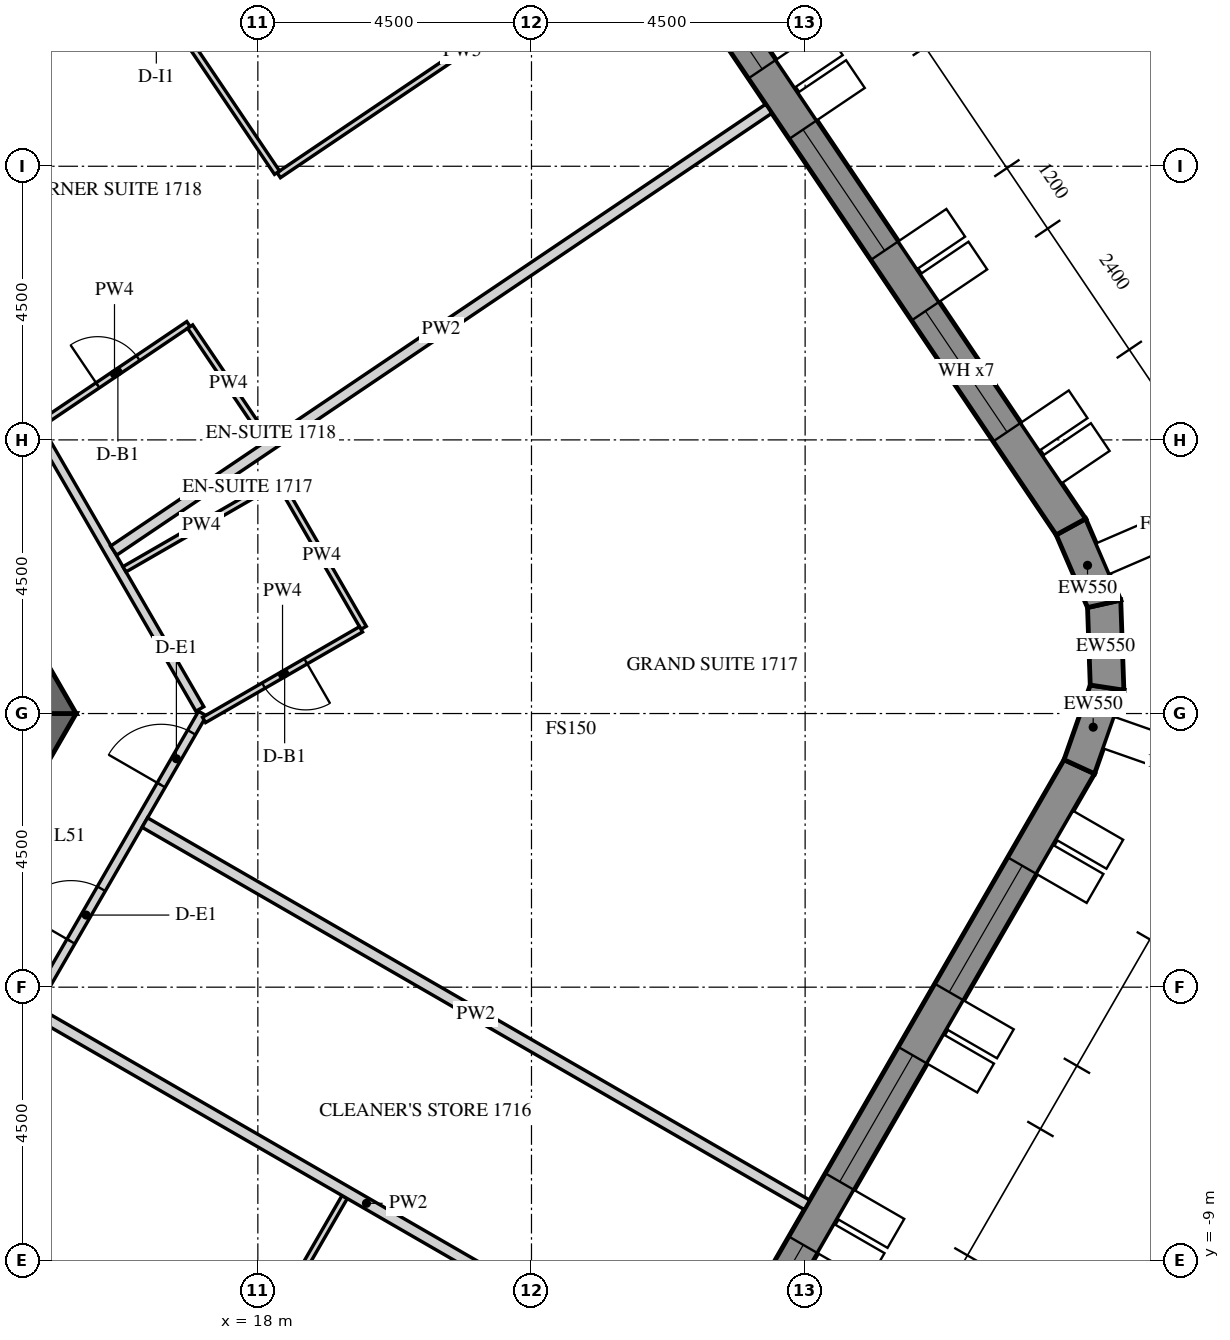
"""IFC4 building model, lengths in metres.
Left out: names, types, materials, properties, quantities, classifications, styles, units other than length and angle.
Written with IfcOpenShell. Run it as: python <this file> out.ifc"""

import sys

from ifc_helpers import new_model, si_unit, direction, frame, frame_2d, origin, place, context, subcontext, project, spatial, polyline, rectangle, outline, extrude, element, fill, save


model = new_model("IFC4")
c1 = context("Model", 3, precision=1e-05, world=origin(), true_north=direction((0.0, 1.0)))
c2 = subcontext(c1, "Body", "Model", "MODEL_VIEW")
j1 = project(units=[si_unit("LENGTHUNIT", "METRE"), si_unit("PLANEANGLEUNIT", "RADIAN")], contexts=[c1])
p1 = place(None, origin())
s1 = spatial("IfcSite", under=j1, at=p1, CompositionType="ELEMENT")
p2 = place(p1, origin())
s2 = spatial("IfcBuilding", under=s1, at=p2, CompositionType="ELEMENT")
p3 = place(p2, frame((0.0, 0.0, 215.1)))
s3 = spatial("IfcBuildingStorey", under=s2, at=p3, CompositionType="ELEMENT", Elevation=215.1)
p4 = place(p3, frame((17.63, -24.914, -0.15), z_axis=(0.0, 0.0, 1.0), x_axis=(0.499998569178, 0.866026229868, 0.0)))
e1 = element("IfcWall", 1, at=p4, inside=s3, PredefinedType="SOLIDWALL", context=c2, shape_type="SweptSolid", body=[
    extrude(outline(polyline([(-0.022, -0.275), (27.783, -0.275), (27.732, 0.275), (0.022, 0.275), (-0.022, -0.275)])), origin(), (0.0, 0.0, 1.0), 3.9),
])
p5 = place(p4, frame((1.879, 0.0, 1.05)))
e2 = element("IfcOpeningElement", 2, at=p5, cuts=e1, PredefinedType="OPENING", context=c2, shape_type="SweptSolid", body=[
    extrude(rectangle(XDim=2.4, YDim=2.4, at=frame_2d((1.2, 1.2))), frame((0.0, 0.285, 0.0), z_axis=(0.0, -1.0, 0.0), x_axis=(1.0, 0.0, 0.0)), (0.0, 0.0, 1.0), 0.57),
])
p6 = place(p4, frame((5.479, 0.0, 1.05)))
e3 = element("IfcOpeningElement", 3, at=p6, cuts=e1, PredefinedType="OPENING", context=c2, shape_type="SweptSolid", body=[
    extrude(rectangle(XDim=2.4, YDim=2.4, at=frame_2d((1.2, 1.2))), frame((0.0, 0.285, 0.0), z_axis=(0.0, -1.0, 0.0), x_axis=(1.0, 0.0, 0.0)), (0.0, 0.0, 1.0), 0.57),
])
p7 = place(p4, frame((9.079, 0.0, 1.05)))
e4 = element("IfcOpeningElement", 4, at=p7, cuts=e1, PredefinedType="OPENING", context=c2, shape_type="SweptSolid", body=[
    extrude(rectangle(XDim=2.4, YDim=2.4, at=frame_2d((1.2, 1.2))), frame((0.0, 0.285, 0.0), z_axis=(0.0, -1.0, 0.0), x_axis=(1.0, 0.0, 0.0)), (0.0, 0.0, 1.0), 0.57),
])
p8 = place(p4, frame((12.679, 0.0, 1.05)))
e5 = element("IfcOpeningElement", 5, at=p8, cuts=e1, PredefinedType="OPENING", context=c2, shape_type="SweptSolid", body=[
    extrude(rectangle(XDim=2.4, YDim=2.4, at=frame_2d((1.2, 1.2))), frame((0.0, 0.285, 0.0), z_axis=(0.0, -1.0, 0.0), x_axis=(1.0, 0.0, 0.0)), (0.0, 0.0, 1.0), 0.57),
])
p9 = place(p4, frame((16.279, 0.0, 1.05)))
e6 = element("IfcOpeningElement", 6, at=p9, cuts=e1, PredefinedType="OPENING", context=c2, shape_type="SweptSolid", body=[
    extrude(rectangle(XDim=2.4, YDim=2.4, at=frame_2d((1.2, 1.2))), frame((0.0, 0.285, 0.0), z_axis=(0.0, -1.0, 0.0), x_axis=(1.0, 0.0, 0.0)), (0.0, 0.0, 1.0), 0.57),
])
p10 = place(p4, frame((19.879, 0.0, 1.05)))
e7 = element("IfcOpeningElement", 7, at=p10, cuts=e1, PredefinedType="OPENING", context=c2, shape_type="SweptSolid", body=[
    extrude(rectangle(XDim=2.4, YDim=2.4, at=frame_2d((1.2, 1.2))), frame((0.0, 0.285, 0.0), z_axis=(0.0, -1.0, 0.0), x_axis=(1.0, 0.0, 0.0)), (0.0, 0.0, 1.0), 0.57),
])
p11 = place(p4, frame((23.479, 0.0, 1.05)))
e8 = element("IfcOpeningElement", 8, at=p11, cuts=e1, PredefinedType="OPENING", context=c2, shape_type="SweptSolid", body=[
    extrude(rectangle(XDim=2.4, YDim=2.4, at=frame_2d((1.2, 1.2))), frame((0.0, 0.285, 0.0), z_axis=(0.0, -1.0, 0.0), x_axis=(1.0, 0.0, 0.0)), (0.0, 0.0, 1.0), 0.57),
])
p12 = place(p3, frame((31.509, -0.875, -0.15), z_axis=(0.0, 0.0, 1.0), x_axis=(0.33111537203, 0.943590276765, 0.0)))
e9 = element("IfcWall", 9, at=p12, inside=s3, PredefinedType="SOLIDWALL", context=c2, shape_type="SweptSolid", body=[
    extrude(outline(polyline([(-0.026, -0.275), (1.431, -0.275), (1.327, 0.275), (0.026, 0.275), (-0.026, -0.275)])), origin(), (0.0, 0.0, 1.0), 3.9),
])
p13 = place(p3, frame((31.966, 0.426, -0.15), z_axis=(0.0, 0.0, 1.0), x_axis=(-0.034876908462, 0.999391615562, 0.0)))
e10 = element("IfcWall", 10, at=p13, inside=s3, PredefinedType="SOLIDWALL", context=c2, shape_type="SweptSolid", body=[
    extrude(outline(polyline([(-0.052, -0.275), (1.431, -0.275), (1.327, 0.275), (0.052, 0.275), (-0.052, -0.275)])), origin(), (0.0, 0.0, 1.0), 3.9),
])
p14 = place(p3, frame((31.917, 1.804, -0.15), z_axis=(0.0, 0.0, 1.0), x_axis=(-0.396225741392, 0.918153125496, 0.0)))
e11 = element("IfcWall", 11, at=p14, inside=s3, PredefinedType="SOLIDWALL", context=c2, shape_type="SweptSolid", body=[
    extrude(outline(polyline([(-0.052, -0.275), (1.405, -0.275), (1.353, 0.275), (0.052, 0.275), (-0.052, -0.275)])), origin(), (0.0, 0.0, 1.0), 3.9),
])
p15 = place(p3, frame((31.371, 3.071, -0.15), z_axis=(0.0, 0.0, 1.0), x_axis=(-0.559189891278, 0.829039604297, 0.0)))
e12 = element("IfcWall", 12, at=p15, inside=s3, PredefinedType="SOLIDWALL", context=c2, shape_type="SweptSolid", body=[
    extrude(outline(polyline([(-0.026, -0.275), (27.781, -0.275), (27.736, 0.275), (0.026, 0.275), (-0.026, -0.275)])), origin(), (0.0, 0.0, 1.0), 3.9),
])
p16 = place(p15, frame((1.879, 0.0, 1.05)))
e13 = element("IfcOpeningElement", 13, at=p16, cuts=e12, PredefinedType="OPENING", context=c2, shape_type="SweptSolid", body=[
    extrude(rectangle(XDim=2.4, YDim=2.4, at=frame_2d((1.2, 1.2))), frame((0.0, 0.285, 0.0), z_axis=(0.0, -1.0, 0.0), x_axis=(1.0, 0.0, 0.0)), (0.0, 0.0, 1.0), 0.57),
])
p17 = place(p15, frame((5.479, 0.0, 1.05)))
e14 = element("IfcOpeningElement", 14, at=p17, cuts=e12, PredefinedType="OPENING", context=c2, shape_type="SweptSolid", body=[
    extrude(rectangle(XDim=2.4, YDim=2.4, at=frame_2d((1.2, 1.2))), frame((0.0, 0.285, 0.0), z_axis=(0.0, -1.0, 0.0), x_axis=(1.0, 0.0, 0.0)), (0.0, 0.0, 1.0), 0.57),
])
p18 = place(p15, frame((9.079, 0.0, 1.05)))
e15 = element("IfcOpeningElement", 15, at=p18, cuts=e12, PredefinedType="OPENING", context=c2, shape_type="SweptSolid", body=[
    extrude(rectangle(XDim=2.4, YDim=2.4, at=frame_2d((1.2, 1.2))), frame((0.0, 0.285, 0.0), z_axis=(0.0, -1.0, 0.0), x_axis=(1.0, 0.0, 0.0)), (0.0, 0.0, 1.0), 0.57),
])
p19 = place(p15, frame((12.679, 0.0, 1.05)))
e16 = element("IfcOpeningElement", 16, at=p19, cuts=e12, PredefinedType="OPENING", context=c2, shape_type="SweptSolid", body=[
    extrude(rectangle(XDim=2.4, YDim=2.4, at=frame_2d((1.2, 1.2))), frame((0.0, 0.285, 0.0), z_axis=(0.0, -1.0, 0.0), x_axis=(1.0, 0.0, 0.0)), (0.0, 0.0, 1.0), 0.57),
])
p20 = place(p15, frame((16.279, 0.0, 1.05)))
e17 = element("IfcOpeningElement", 17, at=p20, cuts=e12, PredefinedType="OPENING", context=c2, shape_type="SweptSolid", body=[
    extrude(rectangle(XDim=2.4, YDim=2.4, at=frame_2d((1.2, 1.2))), frame((0.0, 0.285, 0.0), z_axis=(0.0, -1.0, 0.0), x_axis=(1.0, 0.0, 0.0)), (0.0, 0.0, 1.0), 0.57),
])
p21 = place(p15, frame((19.879, 0.0, 1.05)))
e18 = element("IfcOpeningElement", 18, at=p21, cuts=e12, PredefinedType="OPENING", context=c2, shape_type="SweptSolid", body=[
    extrude(rectangle(XDim=2.4, YDim=2.4, at=frame_2d((1.2, 1.2))), frame((0.0, 0.285, 0.0), z_axis=(0.0, -1.0, 0.0), x_axis=(1.0, 0.0, 0.0)), (0.0, 0.0, 1.0), 0.57),
])
p22 = place(p15, frame((23.479, 0.0, 1.05)))
e19 = element("IfcOpeningElement", 19, at=p22, cuts=e12, PredefinedType="OPENING", context=c2, shape_type="SweptSolid", body=[
    extrude(rectangle(XDim=2.4, YDim=2.4, at=frame_2d((1.2, 1.2))), frame((0.0, 0.285, 0.0), z_axis=(0.0, -1.0, 0.0), x_axis=(1.0, 0.0, 0.0)), (0.0, 0.0, 1.0), 0.57),
])
p23 = place(p3, frame((7.361, -12.75, -0.15), z_axis=(0.0, 0.0, 1.0), x_axis=(0.50000571537, 0.866022103989, 0.0)))
e20 = element("IfcWall", 20, at=p23, inside=s3, PredefinedType="SHEAR", context=c2, shape_type="SweptSolid", body=[
    extrude(outline(polyline([(-0.144, -0.25), (14.867, -0.25), (14.578, 0.25), (0.144, 0.25), (-0.144, -0.25)])), origin(), (0.0, 0.0, 1.0), 3.9),
])
p24 = place(p23, frame((6.49, 0.0, 0.15)))
e21 = element("IfcOpeningElement", 21, at=p24, cuts=e20, PredefinedType="OPENING", context=c2, shape_type="SweptSolid", body=[
    extrude(rectangle(XDim=1.8, YDim=2.4, at=frame_2d((0.9, 1.2))), frame((0.0, 0.26, 0.0), z_axis=(0.0, -1.0, 0.0), x_axis=(1.0, 0.0, 0.0)), (0.0, 0.0, 1.0), 0.52),
])
p25 = place(p3, frame((14.722, 0.0, -0.15), z_axis=(0.0, 0.0, 1.0), x_axis=(-0.50000571537, 0.866022103989, 0.0)))
e22 = element("IfcWall", 22, at=p25, inside=s3, PredefinedType="SHEAR", context=c2, shape_type="SweptSolid", body=[
    extrude(outline(polyline([(-0.144, -0.25), (14.867, -0.25), (14.578, 0.25), (0.144, 0.25), (-0.144, -0.25)])), origin(), (0.0, 0.0, 1.0), 3.9),
])
p26 = place(p25, frame((6.432, 0.0, 0.15)))
e23 = element("IfcOpeningElement", 23, at=p26, cuts=e22, PredefinedType="OPENING", context=c2, shape_type="SweptSolid", body=[
    extrude(rectangle(XDim=1.8, YDim=2.4, at=frame_2d((0.9, 1.2))), frame((0.0, 0.26, 0.0), z_axis=(0.0, -1.0, 0.0), x_axis=(1.0, 0.0, 0.0)), (0.0, 0.0, 1.0), 0.52),
])
p27 = place(p3, frame((9.772, -12.675, 0.0), z_axis=(0.0, 0.0, 1.0), x_axis=(0.499996322767, 0.866027526826, 0.0)))
e24 = element("IfcWall", 24, at=p27, inside=s3, PredefinedType="PARTITIONING", context=c2, shape_type="SweptSolid", body=[
    extrude(rectangle(XDim=14.636, YDim=0.15, at=frame_2d((7.318, 0.0))), origin(), (0.0, 0.0, 1.0), 2.988),
])
p28 = place(p27, frame((5.361, 0.0, 0.0)))
e25 = element("IfcOpeningElement", 25, at=p28, cuts=e24, PredefinedType="OPENING", context=c2, shape_type="SweptSolid", body=[
    extrude(rectangle(XDim=1.0, YDim=2.1, at=frame_2d((0.5, 1.05))), frame((0.0, 0.085, 0.0), z_axis=(0.0, -1.0, 0.0), x_axis=(1.0, 0.0, 0.0)), (0.0, 0.0, 1.0), 0.17),
])
p29 = place(p27, frame((10.309, 0.0, 0.0)))
e26 = element("IfcOpeningElement", 26, at=p29, cuts=e24, PredefinedType="OPENING", context=c2, shape_type="SweptSolid", body=[
    extrude(rectangle(XDim=1.0, YDim=2.1, at=frame_2d((0.5, 1.05))), frame((0.0, 0.085, 0.0), z_axis=(0.0, -1.0, 0.0), x_axis=(1.0, 0.0, 0.0)), (0.0, 0.0, 1.0), 0.17),
])
p30 = place(p27, frame((13.278, 0.0, 0.0)))
e27 = element("IfcOpeningElement", 27, at=p30, cuts=e24, PredefinedType="OPENING", context=c2, shape_type="SweptSolid", body=[
    extrude(rectangle(XDim=1.0, YDim=2.1, at=frame_2d((0.5, 1.05))), frame((0.0, 0.085, 0.0), z_axis=(0.0, -1.0, 0.0), x_axis=(1.0, 0.0, 0.0)), (0.0, 0.0, 1.0), 0.17),
])
p31 = place(p3, frame((17.046, 0.075, 0.0), z_axis=(0.0, 0.0, 1.0), x_axis=(-0.500008833422, 0.866020303746, 0.0)))
e28 = element("IfcWall", 28, at=p31, inside=s3, PredefinedType="PARTITIONING", context=c2, shape_type="SweptSolid", body=[
    extrude(rectangle(XDim=14.636, YDim=0.15, at=frame_2d((7.318, 0.0))), origin(), (0.0, 0.0, 1.0), 2.988),
])
p32 = place(p31, frame((9.07, 0.0, 0.0)))
e29 = element("IfcOpeningElement", 29, at=p32, cuts=e28, PredefinedType="OPENING", context=c2, shape_type="SweptSolid", body=[
    extrude(rectangle(XDim=1.0, YDim=2.1, at=frame_2d((0.5, 1.05))), frame((0.0, 0.085, 0.0), z_axis=(0.0, -1.0, 0.0), x_axis=(1.0, 0.0, 0.0)), (0.0, 0.0, 1.0), 0.17),
])
p33 = place(p3, frame((14.097, -17.183, 0.0), z_axis=(0.0, 0.0, 1.0), x_axis=(0.500001321243, 0.866024640963, 0.0)))
e30 = element("IfcWall", 30, at=p33, inside=s3, PredefinedType="PARTITIONING", context=c2, shape_type="SweptSolid", body=[
    extrude(rectangle(XDim=10.66, YDim=0.1, at=frame_2d((5.33, 0.0))), origin(), (0.0, 0.0, 1.0), 2.988),
])
p34 = place(p33, frame((4.9, 0.0, 0.0)))
e31 = element("IfcOpeningElement", 31, at=p34, cuts=e30, PredefinedType="OPENING", context=c2, shape_type="SweptSolid", body=[
    extrude(rectangle(XDim=0.9, YDim=2.1, at=frame_2d((0.45, 1.05))), frame((0.0, 0.06, 0.0), z_axis=(0.0, -1.0, 0.0), x_axis=(1.0, 0.0, 0.0)), (0.0, 0.0, 1.0), 0.12),
])
p35 = place(p3, frame((25.231, -11.198, 0.0), z_axis=(0.0, 0.0, 1.0), x_axis=(-0.866032662629, 0.499987427101, 0.0)))
e32 = element("IfcWall", 32, at=p35, inside=s3, PredefinedType="PARTITIONING", context=c2, shape_type="SweptSolid", body=[
    extrude(rectangle(XDim=12.575, YDim=0.18, at=frame_2d((6.288, 0.0))), origin(), (0.0, 0.0, 1.0), 2.988),
])
p36 = place(p3, frame((27.031, -8.08, 0.0), z_axis=(0.0, 0.0, 1.0), x_axis=(-0.86602780907, 0.499995833901, 0.0)))
e33 = element("IfcWall", 33, at=p36, inside=s3, PredefinedType="PARTITIONING", context=c2, shape_type="SweptSolid", body=[
    extrude(rectangle(XDim=12.575, YDim=0.18, at=frame_2d((6.287, 0.0))), origin(), (0.0, 0.0, 1.0), 2.988),
])
p37 = place(p3, frame((15.807, 2.372, 0.0), z_axis=(0.0, 0.0, 1.0), x_axis=(0.86601045545, 0.500025890382, 0.0)))
e34 = element("IfcWall", 34, at=p37, inside=s3, PredefinedType="PARTITIONING", context=c2, shape_type="SweptSolid", body=[
    extrude(rectangle(XDim=2.925, YDim=0.1, at=frame_2d((1.462, 0.0))), origin(), (0.0, 0.0, 1.0), 2.988),
])
p38 = place(p3, frame((18.365, 3.791, 0.0), z_axis=(0.0, 0.0, 1.0), x_axis=(0.499996545922, -0.866027397988, 0.0)))
e35 = element("IfcWall", 35, at=p38, inside=s3, PredefinedType="PARTITIONING", context=c2, shape_type="SweptSolid", body=[
    extrude(rectangle(XDim=2.75, YDim=0.1, at=frame_2d((1.375, 0.0))), origin(), (0.0, 0.0, 1.0), 2.988),
])
p39 = place(p3, frame((19.697, 1.385, 0.0), z_axis=(0.0, 0.0, 1.0), x_axis=(-0.866036909293, -0.499980071345, 0.0)))
e36 = element("IfcWall", 36, at=p39, inside=s3, PredefinedType="PARTITIONING", context=c2, shape_type="SweptSolid", body=[
    extrude(rectangle(XDim=2.98, YDim=0.1, at=frame_2d((1.49, 0.0))), origin(), (0.0, 0.0, 1.0), 2.988),
])
p40 = place(p39, frame((1.05, 0.0, 0.0)))
e37 = element("IfcOpeningElement", 37, at=p40, cuts=e36, PredefinedType="OPENING", context=c2, shape_type="SweptSolid", body=[
    extrude(rectangle(XDim=0.8, YDim=2.1, at=frame_2d((0.4, 1.05))), frame((0.0, 0.06, 0.0), z_axis=(0.0, -1.0, 0.0), x_axis=(1.0, 0.0, 0.0)), (0.0, 0.0, 1.0), 0.12),
])
p41 = place(p3, frame((26.402, 9.946, 0.0), z_axis=(0.0, 0.0, 1.0), x_axis=(-0.829032022697, -0.559201131386, 0.0)))
e38 = element("IfcWall", 38, at=p41, inside=s3, PredefinedType="PARTITIONING", context=c2, shape_type="SweptSolid", body=[
    extrude(rectangle(XDim=12.995, YDim=0.18, at=frame_2d((6.497, 0.0))), origin(), (0.0, 0.0, 1.0), 2.988),
])
p42 = place(p3, frame((14.426, 4.763, 0.0), z_axis=(0.0, 0.0, 1.0), x_axis=(0.829055983973, 0.559165606451, 0.0)))
e39 = element("IfcWall", 39, at=p42, inside=s3, PredefinedType="PARTITIONING", context=c2, shape_type="SweptSolid", body=[
    extrude(rectangle(XDim=2.935, YDim=0.1, at=frame_2d((1.467, 0.0))), origin(), (0.0, 0.0, 1.0), 2.988),
])
p43 = place(p42, frame((1.135, 0.0, 0.0)))
e40 = element("IfcOpeningElement", 40, at=p43, cuts=e39, PredefinedType="OPENING", context=c2, shape_type="SweptSolid", body=[
    extrude(rectangle(XDim=0.8, YDim=2.1, at=frame_2d((0.4, 1.05))), frame((0.0, 0.06, 0.0), z_axis=(0.0, -1.0, 0.0), x_axis=(1.0, 0.0, 0.0)), (0.0, 0.0, 1.0), 0.12),
])
p44 = place(p3, frame((16.887, 6.363, 0.0), z_axis=(0.0, 0.0, 1.0), x_axis=(0.559179660023, -0.829046505219, 0.0)))
e41 = element("IfcWall", 41, at=p44, inside=s3, PredefinedType="PARTITIONING", context=c2, shape_type="SweptSolid", body=[
    extrude(rectangle(XDim=2.26, YDim=0.1, at=frame_2d((1.13, 0.0))), origin(), (0.0, 0.0, 1.0), 2.988),
])
p45 = place(p3, frame((24.389, 12.931, 0.0), z_axis=(0.0, 0.0, 1.0), x_axis=(-0.829029895244, -0.559204285383, 0.0)))
e42 = element("IfcWall", 42, at=p45, inside=s3, PredefinedType="PARTITIONING", context=c2, shape_type="SweptSolid", body=[
    extrude(rectangle(XDim=7.292, YDim=0.1, at=frame_2d((3.646, 0.0))), origin(), (0.0, 0.0, 1.0), 2.988),
])
p46 = place(p3, frame((18.315, 8.895, 0.0), z_axis=(0.0, 0.0, 1.0), x_axis=(-0.559177045947, 0.829048268369, 0.0)))
e43 = element("IfcWall", 43, at=p46, inside=s3, PredefinedType="PARTITIONING", context=c2, shape_type="SweptSolid", body=[
    extrude(rectangle(XDim=7.06, YDim=0.1, at=frame_2d((3.53, 0.0))), origin(), (0.0, 0.0, 1.0), 2.988),
])
p47 = place(p46, frame((3.1, 0.0, 0.0)))
e44 = element("IfcOpeningElement", 44, at=p47, cuts=e43, PredefinedType="OPENING", context=c2, shape_type="SweptSolid", body=[
    extrude(rectangle(XDim=0.9, YDim=2.1, at=frame_2d((0.45, 1.05))), frame((0.0, 0.06, 0.0), z_axis=(0.0, -1.0, 0.0), x_axis=(1.0, 0.0, 0.0)), (0.0, 0.0, 1.0), 0.12),
])
p48 = place(p9, frame((0.0, 0.205, 0.0)))
e45 = element("IfcWindow", 45, at=p48, inside=s3, PartitioningType="DOUBLE_PANEL_VERTICAL", PredefinedType="WINDOW", context=c2, shape_type="SweptSolid", body=[
    extrude(rectangle(XDim=2.4, YDim=2.4, at=frame_2d((1.2, 1.2))), frame((0.0, 0.03, 0.0), z_axis=(0.0, -1.0, 0.0), x_axis=(1.0, 0.0, 0.0)), (0.0, 0.0, 1.0), 0.06),
])
fill(e6, e45)
p49 = place(p10, frame((0.0, 0.205, 0.0)))
e46 = element("IfcWindow", 46, at=p49, inside=s3, PartitioningType="DOUBLE_PANEL_VERTICAL", PredefinedType="WINDOW", context=c2, shape_type="SweptSolid", body=[
    extrude(rectangle(XDim=2.4, YDim=2.4, at=frame_2d((1.2, 1.2))), frame((0.0, 0.03, 0.0), z_axis=(0.0, -1.0, 0.0), x_axis=(1.0, 0.0, 0.0)), (0.0, 0.0, 1.0), 0.06),
])
fill(e7, e46)
p50 = place(p11, frame((0.0, 0.205, 0.0)))
e47 = element("IfcWindow", 47, at=p50, inside=s3, PartitioningType="DOUBLE_PANEL_VERTICAL", PredefinedType="WINDOW", context=c2, shape_type="SweptSolid", body=[
    extrude(rectangle(XDim=2.4, YDim=2.4, at=frame_2d((1.2, 1.2))), frame((0.0, 0.03, 0.0), z_axis=(0.0, -1.0, 0.0), x_axis=(1.0, 0.0, 0.0)), (0.0, 0.0, 1.0), 0.06),
])
fill(e8, e47)
p51 = place(p16, frame((0.0, 0.205, 0.0)))
e48 = element("IfcWindow", 48, at=p51, inside=s3, PartitioningType="DOUBLE_PANEL_VERTICAL", PredefinedType="WINDOW", context=c2, shape_type="SweptSolid", body=[
    extrude(rectangle(XDim=2.4, YDim=2.4, at=frame_2d((1.2, 1.2))), frame((0.0, 0.03, 0.0), z_axis=(0.0, -1.0, 0.0), x_axis=(1.0, 0.0, 0.0)), (0.0, 0.0, 1.0), 0.06),
])
fill(e13, e48)
p52 = place(p17, frame((0.0, 0.205, 0.0)))
e49 = element("IfcWindow", 49, at=p52, inside=s3, PartitioningType="DOUBLE_PANEL_VERTICAL", PredefinedType="WINDOW", context=c2, shape_type="SweptSolid", body=[
    extrude(rectangle(XDim=2.4, YDim=2.4, at=frame_2d((1.2, 1.2))), frame((0.0, 0.03, 0.0), z_axis=(0.0, -1.0, 0.0), x_axis=(1.0, 0.0, 0.0)), (0.0, 0.0, 1.0), 0.06),
])
fill(e14, e49)
p53 = place(p18, frame((0.0, 0.205, 0.0)))
e50 = element("IfcWindow", 50, at=p53, inside=s3, PartitioningType="DOUBLE_PANEL_VERTICAL", PredefinedType="WINDOW", context=c2, shape_type="SweptSolid", body=[
    extrude(rectangle(XDim=2.4, YDim=2.4, at=frame_2d((1.2, 1.2))), frame((0.0, 0.03, 0.0), z_axis=(0.0, -1.0, 0.0), x_axis=(1.0, 0.0, 0.0)), (0.0, 0.0, 1.0), 0.06),
])
fill(e15, e50)
p54 = place(p29, origin())
e51 = element("IfcDoor", 51, at=p54, inside=s3, OperationType="SINGLE_SWING_LEFT", PredefinedType="DOOR", context=c2, shape_type="SweptSolid", body=[
    extrude(rectangle(XDim=1.0, YDim=2.1, at=frame_2d((0.5, 1.05))), frame((0.0, 0.025, 0.0), z_axis=(0.0, -1.0, 0.0), x_axis=(1.0, 0.0, 0.0)), (0.0, 0.0, 1.0), 0.05),
])
fill(e26, e51)
p55 = place(p30, origin())
e52 = element("IfcDoor", 52, at=p55, inside=s3, OperationType="SINGLE_SWING_LEFT", PredefinedType="DOOR", context=c2, shape_type="SweptSolid", body=[
    extrude(rectangle(XDim=1.0, YDim=2.1, at=frame_2d((0.5, 1.05))), frame((0.0, 0.025, 0.0), z_axis=(0.0, -1.0, 0.0), x_axis=(1.0, 0.0, 0.0)), (0.0, 0.0, 1.0), 0.05),
])
fill(e27, e52)
p56 = place(p40, origin())
e53 = element("IfcDoor", 53, at=p56, inside=s3, OperationType="SINGLE_SWING_RIGHT", PredefinedType="DOOR", context=c2, shape_type="SweptSolid", body=[
    extrude(rectangle(XDim=0.8, YDim=2.1, at=frame_2d((0.4, 1.05))), frame((0.0, 0.025, 0.0), z_axis=(0.0, -1.0, 0.0), x_axis=(1.0, 0.0, 0.0)), (0.0, 0.0, 1.0), 0.05),
])
fill(e37, e53)
p57 = place(p43, origin())
e54 = element("IfcDoor", 54, at=p57, inside=s3, OperationType="SINGLE_SWING_LEFT", PredefinedType="DOOR", context=c2, shape_type="SweptSolid", body=[
    extrude(rectangle(XDim=0.8, YDim=2.1, at=frame_2d((0.4, 1.05))), frame((0.0, 0.025, 0.0), z_axis=(0.0, -1.0, 0.0), x_axis=(1.0, 0.0, 0.0)), (0.0, 0.0, 1.0), 0.05),
])
fill(e40, e54)
save(model, sys.argv[1])
